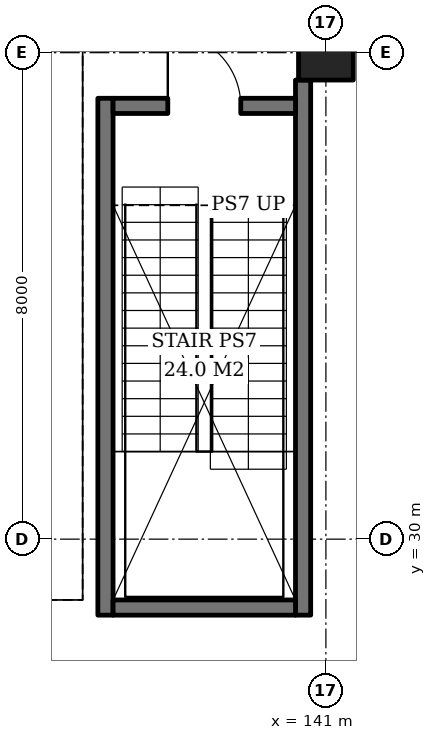
"""IFC4 building model, lengths in metres.
Left out: names, types, materials, properties, quantities, classifications, styles, units other than length and angle.
Written with IfcOpenShell. Run it as: python <this file> out.ifc"""

import sys

from ifc_helpers import new_model, si_unit, direction, frame, frame_2d, origin, origin_2d, place, context, subcontext, project, spatial, rectangle, extrude, element, fill, save


model = new_model("IFC4")
c1 = context("Model", 3, precision=1e-05, world=origin(), true_north=direction((0.0, 1.0)))
c2 = subcontext(c1, "Body", "Model", "MODEL_VIEW")
j1 = project(units=[si_unit("LENGTHUNIT", "METRE"), si_unit("PLANEANGLEUNIT", "RADIAN")], contexts=[c1])
p1 = place(None, origin())
s1 = spatial("IfcSite", under=j1, at=p1, CompositionType="ELEMENT")
p2 = place(p1, origin())
s2 = spatial("IfcBuilding", under=s1, at=p2, CompositionType="ELEMENT")
p3 = place(p2, frame((0.0, 0.0, 16.0)))
s3 = spatial("IfcBuildingStorey", under=s2, at=p3, CompositionType="ELEMENT", Elevation=16.0)
p4 = place(p3, frame((141.0, 38.0, 0.0), z_axis=(0.0, 0.0, 1.0), x_axis=(1.0, 0.0, 0.0)))
e1 = element("IfcColumn", 1, at=p4, inside=s3, PredefinedType="COLUMN", context=c2, shape_type="SweptSolid", body=[
    extrude(rectangle(XDim=0.9, YDim=0.9, at=origin_2d()), origin(), (0.0, 0.0, 1.0), 5.0),
])
p5 = place(p3, frame((137.375, 28.75, 0.0), z_axis=(0.0, 0.0, 1.0), x_axis=(0.0, 1.0, 0.0)))
e2 = element("IfcWall", 2, at=p5, inside=s3, PredefinedType="SOLIDWALL", context=c2, shape_type="SweptSolid", body=[
    extrude(rectangle(XDim=8.5, YDim=0.25, at=frame_2d((4.25, 0.0))), origin(), (0.0, 0.0, 1.0), 4.7),
])
p6 = place(p3, frame((140.625, 28.75, 0.0), z_axis=(0.0, 0.0, 1.0), x_axis=(0.0, 1.0, 0.0)))
e3 = element("IfcWall", 3, at=p6, inside=s3, PredefinedType="SOLIDWALL", context=c2, shape_type="SweptSolid", body=[
    extrude(rectangle(XDim=8.8, YDim=0.25, at=frame_2d((4.4, 0.0))), origin(), (0.0, 0.0, 1.0), 4.7),
])
p7 = place(p3, frame((137.5, 28.875, 0.0), z_axis=(0.0, 0.0, 1.0), x_axis=(1.0, 0.0, 0.0)))
e4 = element("IfcWall", 4, at=p7, inside=s3, PredefinedType="SOLIDWALL", context=c2, shape_type="SweptSolid", body=[
    extrude(rectangle(XDim=3.0, YDim=0.25, at=frame_2d((1.5, 0.0))), origin(), (0.0, 0.0, 1.0), 4.7),
])
p8 = place(p3, frame((137.5, 37.125, 0.0), z_axis=(0.0, 0.0, 1.0), x_axis=(1.0, 0.0, 0.0)))
e5 = element("IfcWall", 5, at=p8, inside=s3, PredefinedType="SOLIDWALL", context=c2, shape_type="SweptSolid", body=[
    extrude(rectangle(XDim=3.0, YDim=0.25, at=frame_2d((1.5, 0.0))), origin(), (0.0, 0.0, 1.0), 4.7),
])
p9 = place(p8, frame((0.9, 0.0, 0.0)))
e6 = element("IfcOpeningElement", 6, at=p9, cuts=e5, PredefinedType="OPENING", context=c2, shape_type="SweptSolid", body=[
    extrude(rectangle(XDim=1.2, YDim=2.1, at=frame_2d((0.6, 1.05))), frame((0.0, 0.135, 0.0), z_axis=(0.0, -1.0, 0.0), x_axis=(1.0, 0.0, 0.0)), (0.0, 0.0, 1.0), 0.27),
])
p10 = place(p9, origin())
e7 = element("IfcDoor", 7, at=p10, inside=s3, OperationType="SINGLE_SWING_LEFT", PredefinedType="DOOR", context=c2, shape_type="SweptSolid", body=[
    extrude(rectangle(XDim=1.2, YDim=2.1, at=frame_2d((0.6, 1.05))), frame((0.0, 0.025, 0.0), z_axis=(0.0, -1.0, 0.0), x_axis=(1.0, 0.0, 0.0)), (0.0, 0.0, 1.0), 0.05),
])
fill(e6, e7)
save(model, sys.argv[1])
